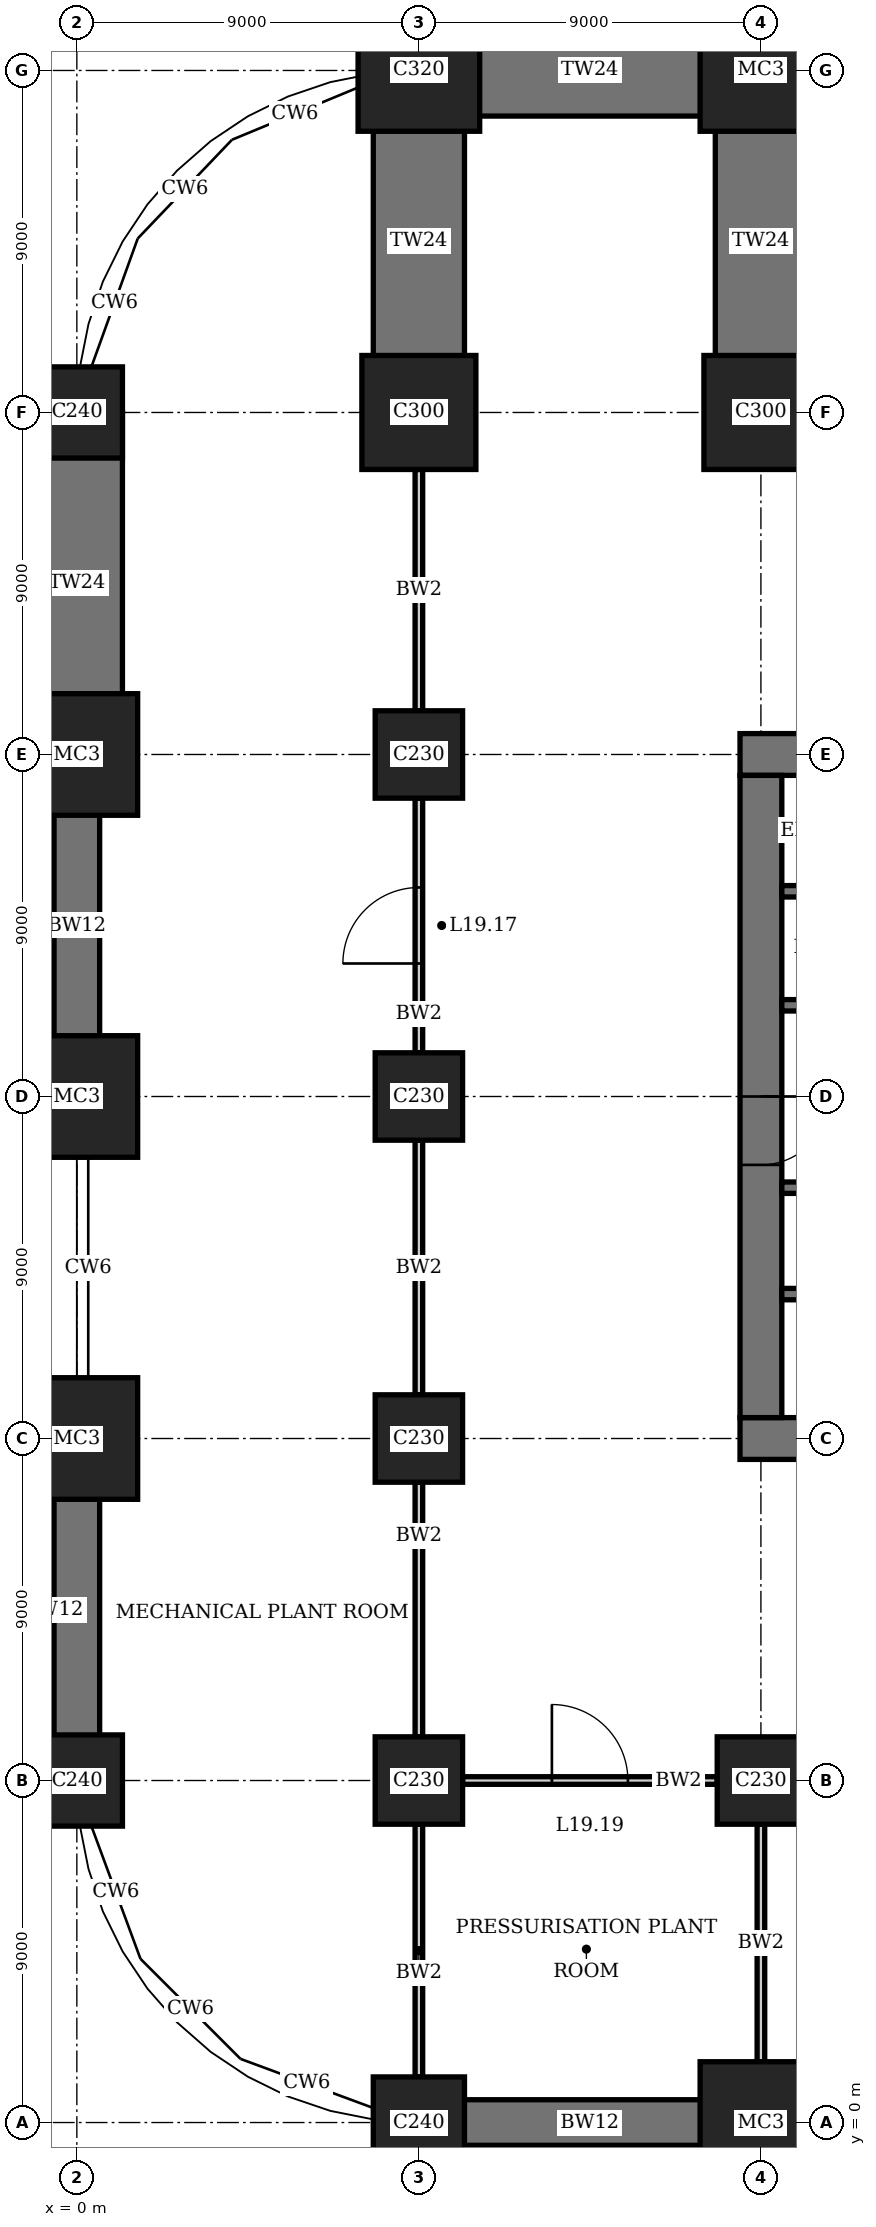
"""IFC4 building model, lengths in metres.
Left out: names, types, materials, properties, quantities, classifications, styles, units other than length and angle.
Written with IfcOpenShell. Run it as: python <this file> out.ifc"""

import sys

from ifc_helpers import new_model, si_unit, direction, frame, frame_2d, origin, origin_2d, place, context, subcontext, project, spatial, rectangle, extrude, element, fill, save


model = new_model("IFC4")
c1 = context("Model", 3, precision=1e-05, world=origin(), true_north=direction((0.0, 1.0)))
c2 = subcontext(c1, "Body", "Model", "MODEL_VIEW")
j1 = project(units=[si_unit("LENGTHUNIT", "METRE"), si_unit("PLANEANGLEUNIT", "RADIAN")], contexts=[c1])
p1 = place(None, origin())
s1 = spatial("IfcSite", under=j1, at=p1, CompositionType="ELEMENT")
p2 = place(p1, origin())
s2 = spatial("IfcBuilding", under=s1, at=p2, CompositionType="ELEMENT")
p3 = place(p2, frame((0.0, 0.0, 80.0)))
s3 = spatial("IfcBuildingStorey", under=s2, at=p3, CompositionType="ELEMENT", Elevation=80.0)
p4 = place(p3, frame((0.0, 9.0, 0.0), z_axis=(0.0, 0.0, 1.0), x_axis=(1.0, 0.0, 0.0)))
e1 = element("IfcColumn", 1, at=p4, inside=s3, PredefinedType="COLUMN", context=c2, shape_type="SweptSolid", body=[
    extrude(rectangle(XDim=2.4, YDim=2.4, at=origin_2d()), origin(), (0.0, 0.0, 1.0), 5.0),
])
for number, where, z_axis, x_axis in (
    (2, (0.0, 18.0, 0.0), (0.0, 0.0, 1.0), (1.0, 0.0, 0.0)),
    (3, (0.0, 27.0, 0.0), (0.0, 0.0, 1.0), (1.0, 0.0, 0.0)),
    (4, (0.0, 36.0, 0.0), (0.0, 0.0, 1.0), (1.0, 0.0, 0.0)),
):
    element("IfcColumn", number, at=place(p3, frame(where, z_axis=z_axis, x_axis=x_axis)), inside=s3, PredefinedType="COLUMN", context=c2, shape_type="SweptSolid", body=[
        extrude(rectangle(XDim=3.2, YDim=3.2, at=origin_2d()), origin(), (0.0, 0.0, 1.0), 5.0),
    ])
for number, where, z_axis, x_axis in (
    (5, (0.0, 45.0, 0.0), (0.0, 0.0, 1.0), (1.0, 0.0, 0.0)),
    (6, (9.0, 0.0, 0.0), (0.0, 0.0, 1.0), (1.0, 0.0, 0.0)),
):
    element("IfcColumn", number, at=place(p3, frame(where, z_axis=z_axis, x_axis=x_axis)), inside=s3, PredefinedType="COLUMN", context=c2, shape_type="SweptSolid", body=[
        extrude(rectangle(XDim=2.4, YDim=2.4, at=origin_2d()), origin(), (0.0, 0.0, 1.0), 5.0),
    ])
for number, where, z_axis, x_axis in (
    (7, (9.0, 9.0, 0.0), (0.0, 0.0, 1.0), (1.0, 0.0, 0.0)),
    (8, (9.0, 18.0, 0.0), (0.0, 0.0, 1.0), (1.0, 0.0, 0.0)),
    (9, (9.0, 27.0, 0.0), (0.0, 0.0, 1.0), (1.0, 0.0, 0.0)),
    (10, (9.0, 36.0, 0.0), (0.0, 0.0, 1.0), (1.0, 0.0, 0.0)),
):
    element("IfcColumn", number, at=place(p3, frame(where, z_axis=z_axis, x_axis=x_axis)), inside=s3, PredefinedType="COLUMN", context=c2, shape_type="SweptSolid", body=[
        extrude(rectangle(XDim=2.3, YDim=2.3, at=origin_2d()), origin(), (0.0, 0.0, 1.0), 5.0),
    ])
p5 = place(p3, frame((9.0, 45.0, 0.0), z_axis=(0.0, 0.0, 1.0), x_axis=(1.0, 0.0, 0.0)))
e11 = element("IfcColumn", 11, at=p5, inside=s3, PredefinedType="COLUMN", context=c2, shape_type="SweptSolid", body=[
    extrude(rectangle(XDim=3.0, YDim=3.0, at=origin_2d()), origin(), (0.0, 0.0, 1.0), 5.0),
])
for number, where, z_axis, x_axis in (
    (12, (9.0, 54.0, 0.0), (0.0, 0.0, 1.0), (1.0, 0.0, 0.0)),
    (13, (18.0, 0.0, 0.0), (0.0, 0.0, 1.0), (1.0, 0.0, 0.0)),
):
    element("IfcColumn", number, at=place(p3, frame(where, z_axis=z_axis, x_axis=x_axis)), inside=s3, PredefinedType="COLUMN", context=c2, shape_type="SweptSolid", body=[
        extrude(rectangle(XDim=3.2, YDim=3.2, at=origin_2d()), origin(), (0.0, 0.0, 1.0), 5.0),
    ])
p6 = place(p3, frame((18.0, 9.0, 0.0), z_axis=(0.0, 0.0, 1.0), x_axis=(1.0, 0.0, 0.0)))
e14 = element("IfcColumn", 14, at=p6, inside=s3, PredefinedType="COLUMN", context=c2, shape_type="SweptSolid", body=[
    extrude(rectangle(XDim=2.3, YDim=2.3, at=origin_2d()), origin(), (0.0, 0.0, 1.0), 5.0),
])
p7 = place(p3, frame((18.0, 45.0, 0.0), z_axis=(0.0, 0.0, 1.0), x_axis=(1.0, 0.0, 0.0)))
e15 = element("IfcColumn", 15, at=p7, inside=s3, PredefinedType="COLUMN", context=c2, shape_type="SweptSolid", body=[
    extrude(rectangle(XDim=3.0, YDim=3.0, at=origin_2d()), origin(), (0.0, 0.0, 1.0), 5.0),
])
p8 = place(p3, frame((18.0, 54.0, 0.0), z_axis=(0.0, 0.0, 1.0), x_axis=(1.0, 0.0, 0.0)))
e16 = element("IfcColumn", 16, at=p8, inside=s3, PredefinedType="COLUMN", context=c2, shape_type="SweptSolid", body=[
    extrude(rectangle(XDim=3.2, YDim=3.2, at=origin_2d()), origin(), (0.0, 0.0, 1.0), 5.0),
])
p9 = place(p3, frame((17.45, 18.0, 0.0), z_axis=(0.0, 0.0, 1.0), x_axis=(1.0, 0.0, 0.0)))
e17 = element("IfcWall", 17, at=p9, inside=s3, PredefinedType="SHEAR", context=c2, shape_type="SweptSolid", body=[
    extrude(rectangle(XDim=28.1, YDim=1.1, at=frame_2d((14.05, 0.0))), origin(), (0.0, 0.0, 1.0), 5.0),
])
p10 = place(p9, frame((11.55, 0.0, 0.0)))
e18 = element("IfcOpeningElement", 18, at=p10, cuts=e17, PredefinedType="OPENING", context=c2, shape_type="SweptSolid", body=[
    extrude(rectangle(XDim=1.0, YDim=2.4, at=frame_2d((0.5, 1.2))), frame((0.0, 0.56, 0.0), z_axis=(0.0, -1.0, 0.0), x_axis=(1.0, 0.0, 0.0)), (0.0, 0.0, 1.0), 1.12),
])
p11 = place(p9, frame((16.55, 0.0, 0.0)))
e19 = element("IfcOpeningElement", 19, at=p11, cuts=e17, PredefinedType="OPENING", context=c2, shape_type="SweptSolid", body=[
    extrude(rectangle(XDim=1.0, YDim=2.4, at=frame_2d((0.5, 1.2))), frame((0.0, 0.56, 0.0), z_axis=(0.0, -1.0, 0.0), x_axis=(1.0, 0.0, 0.0)), (0.0, 0.0, 1.0), 1.12),
])
p12 = place(p9, frame((20.0, 0.0, 0.0)))
e20 = element("IfcOpeningElement", 20, at=p12, cuts=e17, PredefinedType="OPENING", context=c2, shape_type="SweptSolid", body=[
    extrude(rectangle(XDim=1.1, YDim=2.4, at=frame_2d((0.55, 1.2))), frame((0.0, 0.56, 0.0), z_axis=(0.0, -1.0, 0.0), x_axis=(1.0, 0.0, 0.0)), (0.0, 0.0, 1.0), 1.12),
])
p13 = place(p9, frame((24.05, 0.0, 0.0)))
e21 = element("IfcOpeningElement", 21, at=p13, cuts=e17, PredefinedType="OPENING", context=c2, shape_type="SweptSolid", body=[
    extrude(rectangle(XDim=1.0, YDim=2.4, at=frame_2d((0.5, 1.2))), frame((0.0, 0.56, 0.0), z_axis=(0.0, -1.0, 0.0), x_axis=(1.0, 0.0, 0.0)), (0.0, 0.0, 1.0), 1.12),
])
p14 = place(p3, frame((45.55, 36.0, 0.0), z_axis=(0.0, 0.0, 1.0), x_axis=(-1.0, 0.0, 0.0)))
e22 = element("IfcWall", 22, at=p14, inside=s3, PredefinedType="SHEAR", context=c2, shape_type="SweptSolid", body=[
    extrude(rectangle(XDim=28.1, YDim=1.1, at=frame_2d((14.05, 0.0))), origin(), (0.0, 0.0, 1.0), 5.0),
])
p15 = place(p14, frame((11.55, 0.0, 0.0)))
e23 = element("IfcOpeningElement", 23, at=p15, cuts=e22, PredefinedType="OPENING", context=c2, shape_type="SweptSolid", body=[
    extrude(rectangle(XDim=1.0, YDim=2.4, at=frame_2d((0.5, 1.2))), frame((0.0, 0.56, 0.0), z_axis=(0.0, -1.0, 0.0), x_axis=(1.0, 0.0, 0.0)), (0.0, 0.0, 1.0), 1.12),
])
p16 = place(p14, frame((16.55, 0.0, 0.0)))
e24 = element("IfcOpeningElement", 24, at=p16, cuts=e22, PredefinedType="OPENING", context=c2, shape_type="SweptSolid", body=[
    extrude(rectangle(XDim=1.0, YDim=2.4, at=frame_2d((0.5, 1.2))), frame((0.0, 0.56, 0.0), z_axis=(0.0, -1.0, 0.0), x_axis=(1.0, 0.0, 0.0)), (0.0, 0.0, 1.0), 1.12),
])
p17 = place(p14, frame((20.0, 0.0, 0.0)))
e25 = element("IfcOpeningElement", 25, at=p17, cuts=e22, PredefinedType="OPENING", context=c2, shape_type="SweptSolid", body=[
    extrude(rectangle(XDim=1.1, YDim=2.4, at=frame_2d((0.55, 1.2))), frame((0.0, 0.56, 0.0), z_axis=(0.0, -1.0, 0.0), x_axis=(1.0, 0.0, 0.0)), (0.0, 0.0, 1.0), 1.12),
])
p18 = place(p14, frame((24.05, 0.0, 0.0)))
e26 = element("IfcOpeningElement", 26, at=p18, cuts=e22, PredefinedType="OPENING", context=c2, shape_type="SweptSolid", body=[
    extrude(rectangle(XDim=1.0, YDim=2.4, at=frame_2d((0.5, 1.2))), frame((0.0, 0.56, 0.0), z_axis=(0.0, -1.0, 0.0), x_axis=(1.0, 0.0, 0.0)), (0.0, 0.0, 1.0), 1.12),
])
p19 = place(p3, frame((18.0, 35.45, 0.0), z_axis=(0.0, 0.0, 1.0), x_axis=(0.0, -1.0, 0.0)))
e27 = element("IfcWall", 27, at=p19, inside=s3, PredefinedType="SHEAR", context=c2, shape_type="SweptSolid", body=[
    extrude(rectangle(XDim=16.9, YDim=1.1, at=frame_2d((8.45, 0.0))), origin(), (0.0, 0.0, 1.0), 5.0),
])
p20 = place(p19, frame((8.45, 0.0, 0.0)))
e28 = element("IfcOpeningElement", 28, at=p20, cuts=e27, PredefinedType="OPENING", context=c2, shape_type="SweptSolid", body=[
    extrude(rectangle(XDim=1.8, YDim=2.4, at=frame_2d((0.9, 1.2))), frame((0.0, 0.56, 0.0), z_axis=(0.0, -1.0, 0.0), x_axis=(1.0, 0.0, 0.0)), (0.0, 0.0, 1.0), 1.12),
])
p21 = place(p3, frame((18.55, 21.8, 0.0), z_axis=(0.0, 0.0, 1.0), x_axis=(1.0, 0.0, 0.0)))
e29 = element("IfcWall", 29, at=p21, inside=s3, PredefinedType="SHEAR", context=c2, shape_type="SweptSolid", body=[
    extrude(rectangle(XDim=8.3, YDim=0.3, at=frame_2d((4.15, 0.0))), origin(), (0.0, 0.0, 1.0), 5.0),
])
p22 = place(p21, frame((6.85, 0.0, 0.0)))
e30 = element("IfcOpeningElement", 30, at=p22, cuts=e29, PredefinedType="OPENING", context=c2, shape_type="SweptSolid", body=[
    extrude(rectangle(XDim=1.0, YDim=2.4, at=frame_2d((0.5, 1.2))), frame((0.0, 0.16, 0.0), z_axis=(0.0, -1.0, 0.0), x_axis=(1.0, 0.0, 0.0)), (0.0, 0.0, 1.0), 0.32),
])
p23 = place(p3, frame((18.55, 24.6, 0.0), z_axis=(0.0, 0.0, 1.0), x_axis=(1.0, 0.0, 0.0)))
e31 = element("IfcWall", 31, at=p23, inside=s3, PredefinedType="SHEAR", context=c2, shape_type="SweptSolid", body=[
    extrude(rectangle(XDim=25.9, YDim=0.3, at=frame_2d((12.95, 0.0))), origin(), (0.0, 0.0, 1.0), 5.0),
])
p24 = place(p23, frame((4.95, 0.0, 0.0)))
e32 = element("IfcOpeningElement", 32, at=p24, cuts=e31, PredefinedType="OPENING", context=c2, shape_type="SweptSolid", body=[
    extrude(rectangle(XDim=1.0, YDim=2.4, at=frame_2d((0.5, 1.2))), frame((0.0, 0.16, 0.0), z_axis=(0.0, -1.0, 0.0), x_axis=(1.0, 0.0, 0.0)), (0.0, 0.0, 1.0), 0.32),
])
p25 = place(p23, frame((24.5, 0.0, 0.0)))
e33 = element("IfcOpeningElement", 33, at=p25, cuts=e31, PredefinedType="OPENING", context=c2, shape_type="SweptSolid", body=[
    extrude(rectangle(XDim=0.9, YDim=2.1, at=frame_2d((0.45, 1.05))), frame((0.0, 0.16, 0.0), z_axis=(0.0, -1.0, 0.0), x_axis=(1.0, 0.0, 0.0)), (0.0, 0.0, 1.0), 0.32),
])
p26 = place(p23, frame((21.3, 0.0, 0.0)))
e34 = element("IfcOpeningElement", 34, at=p26, cuts=e31, PredefinedType="OPENING", context=c2, shape_type="SweptSolid", body=[
    extrude(rectangle(XDim=1.3, YDim=2.4, at=frame_2d((0.65, 1.2))), frame((0.0, 0.16, 0.0), z_axis=(0.0, -1.0, 0.0), x_axis=(1.0, 0.0, 0.0)), (0.0, 0.0, 1.0), 0.32),
])
p27 = place(p3, frame((18.55, 29.4, 0.0), z_axis=(0.0, 0.0, 1.0), x_axis=(1.0, 0.0, 0.0)))
e35 = element("IfcWall", 35, at=p27, inside=s3, PredefinedType="SHEAR", context=c2, shape_type="SweptSolid", body=[
    extrude(rectangle(XDim=25.9, YDim=0.3, at=frame_2d((12.95, 0.0))), origin(), (0.0, 0.0, 1.0), 5.0),
])
p28 = place(p27, frame((19.95, 0.0, 0.0)))
e36 = element("IfcOpeningElement", 36, at=p28, cuts=e35, PredefinedType="OPENING", context=c2, shape_type="SweptSolid", body=[
    extrude(rectangle(XDim=1.0, YDim=2.4, at=frame_2d((0.5, 1.2))), frame((0.0, 0.16, 0.0), z_axis=(0.0, -1.0, 0.0), x_axis=(1.0, 0.0, 0.0)), (0.0, 0.0, 1.0), 0.32),
])
p29 = place(p27, frame((0.5, 0.0, 0.0)))
e37 = element("IfcOpeningElement", 37, at=p29, cuts=e35, PredefinedType="OPENING", context=c2, shape_type="SweptSolid", body=[
    extrude(rectangle(XDim=0.9, YDim=2.1, at=frame_2d((0.45, 1.05))), frame((0.0, 0.16, 0.0), z_axis=(0.0, -1.0, 0.0), x_axis=(1.0, 0.0, 0.0)), (0.0, 0.0, 1.0), 0.32),
])
p30 = place(p27, frame((3.3, 0.0, 0.0)))
e38 = element("IfcOpeningElement", 38, at=p30, cuts=e35, PredefinedType="OPENING", context=c2, shape_type="SweptSolid", body=[
    extrude(rectangle(XDim=1.3, YDim=2.4, at=frame_2d((0.65, 1.2))), frame((0.0, 0.16, 0.0), z_axis=(0.0, -1.0, 0.0), x_axis=(1.0, 0.0, 0.0)), (0.0, 0.0, 1.0), 0.32),
])
p31 = place(p3, frame((18.55, 32.4, 0.0), z_axis=(0.0, 0.0, 1.0), x_axis=(1.0, 0.0, 0.0)))
e39 = element("IfcWall", 39, at=p31, inside=s3, PredefinedType="SHEAR", context=c2, shape_type="SweptSolid", body=[
    extrude(rectangle(XDim=17.3, YDim=0.3, at=frame_2d((8.65, 0.0))), origin(), (0.0, 0.0, 1.0), 5.0),
])
p32 = place(p3, frame((9.0, 0.0, 0.0), z_axis=(0.0, 0.0, 1.0), x_axis=(1.0, 0.0, 0.0)))
e40 = element("IfcWall", 40, at=p32, inside=s3, PredefinedType="SHEAR", context=c2, shape_type="SweptSolid", body=[
    extrude(rectangle(XDim=9.0, YDim=1.2, at=frame_2d((4.5, 0.0))), origin(), (0.0, 0.0, 1.0), 5.0),
])
for number, where, z_axis, x_axis in (
    (41, (9.0, 54.0, 0.0), (0.0, 0.0, 1.0), (1.0, 0.0, 0.0)),
    (42, (18.0, 54.0, 0.0), (0.0, 0.0, 1.0), (1.0, 0.0, 0.0)),
):
    element("IfcWall", number, at=place(p3, frame(where, z_axis=z_axis, x_axis=x_axis)), inside=s3, PredefinedType="SHEAR", context=c2, shape_type="SweptSolid", body=[
        extrude(rectangle(XDim=9.0, YDim=2.4, at=frame_2d((4.5, 0.0))), origin(), (0.0, 0.0, 1.0), 5.0),
    ])
for number, where, z_axis, x_axis in (
    (43, (0.0, 9.0, 0.0), (0.0, 0.0, 1.0), (0.0, 1.0, 0.0)),
    (44, (0.0, 27.0, 0.0), (0.0, 0.0, 1.0), (0.0, 1.0, 0.0)),
):
    element("IfcWall", number, at=place(p3, frame(where, z_axis=z_axis, x_axis=x_axis)), inside=s3, PredefinedType="SHEAR", context=c2, shape_type="SweptSolid", body=[
        extrude(rectangle(XDim=9.0, YDim=1.2, at=frame_2d((4.5, 0.0))), origin(), (0.0, 0.0, 1.0), 5.0),
    ])
for number, where, z_axis, x_axis in (
    (45, (0.0, 36.0, 0.0), (0.0, 0.0, 1.0), (0.0, 1.0, 0.0)),
    (46, (9.0, 45.0, 0.0), (0.0, 0.0, 1.0), (0.0, 1.0, 0.0)),
    (47, (18.0, 45.0, 0.0), (0.0, 0.0, 1.0), (0.0, 1.0, 0.0)),
):
    element("IfcWall", number, at=place(p3, frame(where, z_axis=z_axis, x_axis=x_axis)), inside=s3, PredefinedType="SHEAR", context=c2, shape_type="SweptSolid", body=[
        extrude(rectangle(XDim=9.0, YDim=2.4, at=frame_2d((4.5, 0.0))), origin(), (0.0, 0.0, 1.0), 5.0),
    ])
p33 = place(p3, frame((9.0, 1.2, 0.0), z_axis=(0.0, 0.0, 1.0), x_axis=(0.0, 1.0, 0.0)))
e48 = element("IfcWall", 48, at=p33, inside=s3, PredefinedType="SOLIDWALL", context=c2, shape_type="SweptSolid", body=[
    extrude(rectangle(XDim=6.65, YDim=0.2, at=frame_2d((3.325, 0.0))), origin(), (0.0, 0.0, 1.0), 3.8),
])
for number, where, z_axis, x_axis in (
    (49, (9.0, 10.15, 0.0), (0.0, 0.0, 1.0), (0.0, 1.0, 0.0)),
    (50, (9.0, 19.15, 0.0), (0.0, 0.0, 1.0), (0.0, 1.0, 0.0)),
):
    element("IfcWall", number, at=place(p3, frame(where, z_axis=z_axis, x_axis=x_axis)), inside=s3, PredefinedType="SOLIDWALL", context=c2, shape_type="SweptSolid", body=[
        extrude(rectangle(XDim=6.7, YDim=0.2, at=frame_2d((3.35, 0.0))), origin(), (0.0, 0.0, 1.0), 3.8),
    ])
p34 = place(p3, frame((9.0, 28.15, 0.0), z_axis=(0.0, 0.0, 1.0), x_axis=(0.0, 1.0, 0.0)))
e51 = element("IfcWall", 51, at=p34, inside=s3, PredefinedType="SOLIDWALL", context=c2, shape_type="SweptSolid", body=[
    extrude(rectangle(XDim=6.7, YDim=0.2, at=frame_2d((3.35, 0.0))), origin(), (0.0, 0.0, 1.0), 3.8),
])
p35 = place(p34, frame((2.35, 0.0, 0.0)))
e52 = element("IfcOpeningElement", 52, at=p35, cuts=e51, PredefinedType="OPENING", context=c2, shape_type="SweptSolid", body=[
    extrude(rectangle(XDim=2.0, YDim=2.7, at=frame_2d((1.0, 1.35))), frame((0.0, 0.11, 0.0), z_axis=(0.0, -1.0, 0.0), x_axis=(1.0, 0.0, 0.0)), (0.0, 0.0, 1.0), 0.22),
])
p36 = place(p3, frame((9.0, 37.15, 0.0), z_axis=(0.0, 0.0, 1.0), x_axis=(0.0, 1.0, 0.0)))
e53 = element("IfcWall", 53, at=p36, inside=s3, PredefinedType="SOLIDWALL", context=c2, shape_type="SweptSolid", body=[
    extrude(rectangle(XDim=6.35, YDim=0.2, at=frame_2d((3.175, 0.0))), origin(), (0.0, 0.0, 1.0), 3.8),
])
p37 = place(p3, frame((18.0, 1.6, 0.0), z_axis=(0.0, 0.0, 1.0), x_axis=(0.0, 1.0, 0.0)))
e54 = element("IfcWall", 54, at=p37, inside=s3, PredefinedType="SOLIDWALL", context=c2, shape_type="SweptSolid", body=[
    extrude(rectangle(XDim=6.25, YDim=0.2, at=frame_2d((3.125, 0.0))), origin(), (0.0, 0.0, 1.0), 4.0),
])
p38 = place(p3, frame((10.15, 9.0, 0.0), z_axis=(0.0, 0.0, 1.0), x_axis=(1.0, 0.0, 0.0)))
e55 = element("IfcWall", 55, at=p38, inside=s3, PredefinedType="SOLIDWALL", context=c2, shape_type="SweptSolid", body=[
    extrude(rectangle(XDim=6.7, YDim=0.2, at=frame_2d((3.35, 0.0))), origin(), (0.0, 0.0, 1.0), 3.8),
])
p39 = place(p38, frame((2.35, 0.0, 0.0)))
e56 = element("IfcOpeningElement", 56, at=p39, cuts=e55, PredefinedType="OPENING", context=c2, shape_type="SweptSolid", body=[
    extrude(rectangle(XDim=2.0, YDim=2.7, at=frame_2d((1.0, 1.35))), frame((0.0, 0.11, 0.0), z_axis=(0.0, -1.0, 0.0), x_axis=(1.0, 0.0, 0.0)), (0.0, 0.0, 1.0), 0.22),
])
p40 = place(p20, origin())
e57 = element("IfcDoor", 57, at=p40, inside=s3, OperationType="DOUBLE_DOOR_DOUBLE_SWING", PredefinedType="DOOR", context=c2, shape_type="SweptSolid", body=[
    extrude(rectangle(XDim=1.8, YDim=2.4, at=frame_2d((0.9, 1.2))), frame((0.0, 0.03, 0.0), z_axis=(0.0, -1.0, 0.0), x_axis=(1.0, 0.0, 0.0)), (0.0, 0.0, 1.0), 0.06),
    extrude(rectangle(XDim=0.04, YDim=2.4, at=frame_2d((0.02, 1.2))), frame((0.0, 0.55, 0.0), z_axis=(0.0, -1.0, 0.0), x_axis=(1.0, 0.0, 0.0)), (0.0, 0.0, 1.0), 1.1),
    extrude(rectangle(XDim=0.04, YDim=2.4, at=frame_2d((1.78, 1.2))), frame((0.0, 0.55, 0.0), z_axis=(0.0, -1.0, 0.0), x_axis=(1.0, 0.0, 0.0)), (0.0, 0.0, 1.0), 1.1),
    extrude(rectangle(XDim=1.8, YDim=0.04, at=frame_2d((0.9, 2.38))), frame((0.0, 0.55, 0.0), z_axis=(0.0, -1.0, 0.0), x_axis=(1.0, 0.0, 0.0)), (0.0, 0.0, 1.0), 1.1),
])
fill(e28, e57)
p41 = place(p35, origin())
e58 = element("IfcDoor", 58, at=p41, inside=s3, OperationType="DOUBLE_DOOR_SINGLE_SWING", PredefinedType="DOOR", context=c2, shape_type="SweptSolid", body=[
    extrude(rectangle(XDim=2.0, YDim=2.7, at=frame_2d((1.0, 1.35))), frame((0.0, 0.03, 0.0), z_axis=(0.0, -1.0, 0.0), x_axis=(1.0, 0.0, 0.0)), (0.0, 0.0, 1.0), 0.06),
])
fill(e52, e58)
p42 = place(p39, origin())
e59 = element("IfcDoor", 59, at=p42, inside=s3, OperationType="DOUBLE_DOOR_SINGLE_SWING", PredefinedType="DOOR", context=c2, shape_type="SweptSolid", body=[
    extrude(rectangle(XDim=2.0, YDim=2.7, at=frame_2d((1.0, 1.35))), frame((0.0, 0.03, 0.0), z_axis=(0.0, -1.0, 0.0), x_axis=(1.0, 0.0, 0.0)), (0.0, 0.0, 1.0), 0.06),
])
fill(e56, e59)
save(model, sys.argv[1])
